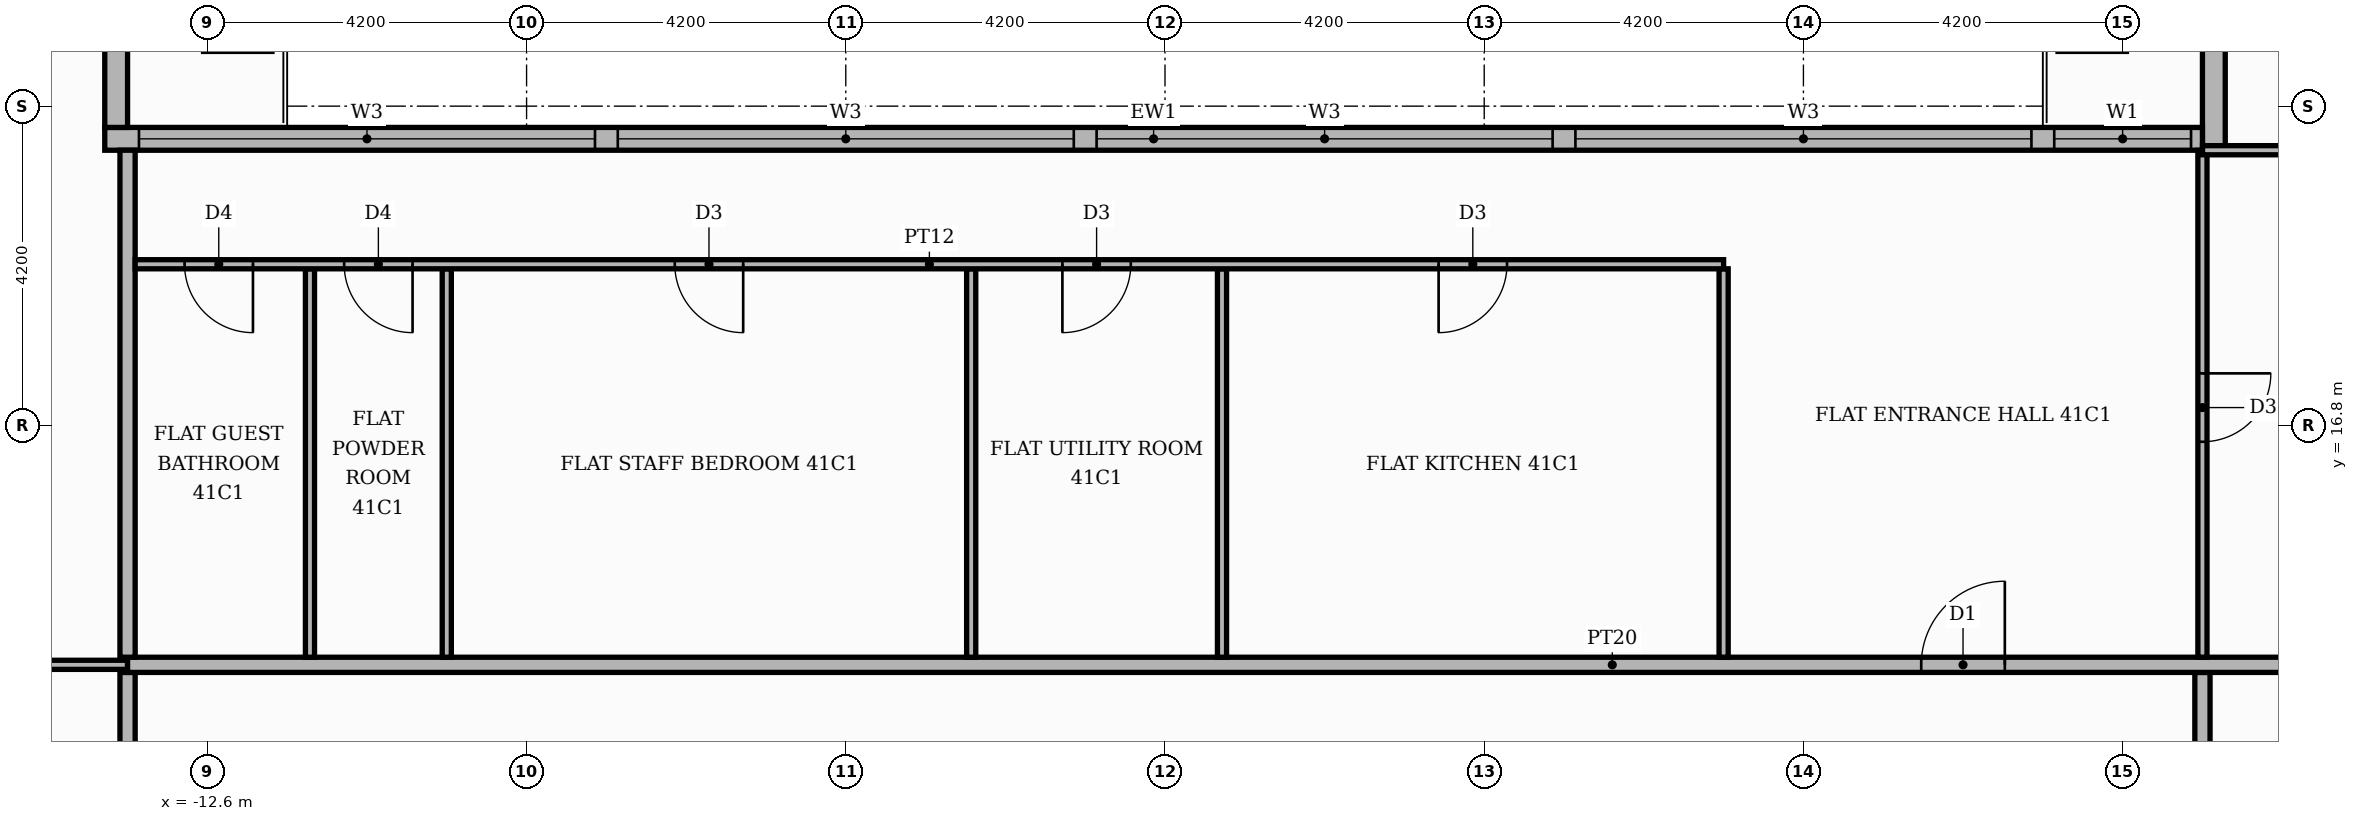
"""IFC4 building model, lengths in metres.
Left out: names, types, materials, properties, quantities, classifications, styles, units other than length and angle.
Written with IfcOpenShell. Run it as: python <this file> out.ifc"""

import sys

from ifc_helpers import new_model, si_unit, direction, frame, frame_2d, origin, place, context, subcontext, project, spatial, rectangle, extrude, element, fill, save


model = new_model("IFC4")
c1 = context("Model", 3, precision=1e-05, world=origin(), true_north=direction((0.0, 1.0)))
c2 = subcontext(c1, "Body", "Model", "MODEL_VIEW")
j1 = project(units=[si_unit("LENGTHUNIT", "METRE"), si_unit("PLANEANGLEUNIT", "RADIAN")], contexts=[c1])
p1 = place(None, origin())
s1 = spatial("IfcSite", under=j1, at=p1, CompositionType="ELEMENT")
p2 = place(p1, origin())
s2 = spatial("IfcBuilding", under=s1, at=p2, CompositionType="ELEMENT")
p3 = place(p2, frame((0.0, 0.0, 172.8)))
s3 = spatial("IfcBuildingStorey", under=s2, at=p3, CompositionType="ELEMENT", Elevation=172.8)
p4 = place(p3, frame((13.8, 25.42, 0.0), z_axis=(0.0, 0.0, 1.0), x_axis=(0.0, -1.0, 0.0)))
e1 = element("IfcWall", 1, at=p4, inside=s3, PredefinedType="STANDARD", context=c2, shape_type="SweptSolid", body=[
    extrude(rectangle(XDim=5.0, YDim=0.3, at=frame_2d((2.5, 0.0))), origin(), (0.0, 0.0, 1.0), 3.48),
])
p5 = place(p4, frame((1.42, 0.0, 0.0)))
e2 = element("IfcOpeningElement", 2, at=p5, cuts=e1, PredefinedType="OPENING", context=c2, shape_type="SweptSolid", body=[
    extrude(rectangle(XDim=1.8, YDim=2.4, at=frame_2d((0.9, 1.2))), frame((0.0, 0.16, 0.0), z_axis=(0.0, -1.0, 0.0), x_axis=(1.0, 0.0, 0.0)), (0.0, 0.0, 1.0), 0.32),
])
p6 = place(p3, frame((13.65, 20.57, 0.0), z_axis=(0.0, 0.0, 1.0), x_axis=(-1.0, 0.0, 0.0)))
e3 = element("IfcWall", 3, at=p6, inside=s3, PredefinedType="STANDARD", context=c2, shape_type="SweptSolid", body=[
    extrude(rectangle(XDim=27.6, YDim=0.3, at=frame_2d((13.8, 0.0))), origin(), (0.0, 0.0, 1.0), 3.48),
])
p7 = place(p6, frame((0.15, 0.0, 0.9)))
e4 = element("IfcOpeningElement", 4, at=p7, cuts=e3, PredefinedType="OPENING", context=c2, shape_type="SweptSolid", body=[
    extrude(rectangle(XDim=1.8, YDim=2.1, at=frame_2d((0.9, 1.05))), frame((0.0, 0.16, 0.0), z_axis=(0.0, -1.0, 0.0), x_axis=(1.0, 0.0, 0.0)), (0.0, 0.0, 1.0), 0.32),
])
p8 = place(p6, frame((2.25, 0.0, 0.9)))
e5 = element("IfcOpeningElement", 5, at=p8, cuts=e3, PredefinedType="OPENING", context=c2, shape_type="SweptSolid", body=[
    extrude(rectangle(XDim=6.0, YDim=2.1, at=frame_2d((3.0, 1.05))), frame((0.0, 0.16, 0.0), z_axis=(0.0, -1.0, 0.0), x_axis=(1.0, 0.0, 0.0)), (0.0, 0.0, 1.0), 0.32),
])
p9 = place(p6, frame((8.55, 0.0, 0.9)))
e6 = element("IfcOpeningElement", 6, at=p9, cuts=e3, PredefinedType="OPENING", context=c2, shape_type="SweptSolid", body=[
    extrude(rectangle(XDim=6.0, YDim=2.1, at=frame_2d((3.0, 1.05))), frame((0.0, 0.16, 0.0), z_axis=(0.0, -1.0, 0.0), x_axis=(1.0, 0.0, 0.0)), (0.0, 0.0, 1.0), 0.32),
])
p10 = place(p6, frame((14.85, 0.0, 0.9)))
e7 = element("IfcOpeningElement", 7, at=p10, cuts=e3, PredefinedType="OPENING", context=c2, shape_type="SweptSolid", body=[
    extrude(rectangle(XDim=6.0, YDim=2.1, at=frame_2d((3.0, 1.05))), frame((0.0, 0.16, 0.0), z_axis=(0.0, -1.0, 0.0), x_axis=(1.0, 0.0, 0.0)), (0.0, 0.0, 1.0), 0.32),
])
p11 = place(p6, frame((21.15, 0.0, 0.9)))
e8 = element("IfcOpeningElement", 8, at=p11, cuts=e3, PredefinedType="OPENING", context=c2, shape_type="SweptSolid", body=[
    extrude(rectangle(XDim=6.0, YDim=2.1, at=frame_2d((3.0, 1.05))), frame((0.0, 0.16, 0.0), z_axis=(0.0, -1.0, 0.0), x_axis=(1.0, 0.0, 0.0)), (0.0, 0.0, 1.0), 0.32),
])
p12 = place(p3, frame((-13.8, 20.72, 0.0), z_axis=(0.0, 0.0, 1.0), x_axis=(0.0, 1.0, 0.0)))
e9 = element("IfcWall", 9, at=p12, inside=s3, PredefinedType="STANDARD", context=c2, shape_type="SweptSolid", body=[
    extrude(rectangle(XDim=5.0, YDim=0.3, at=frame_2d((2.5, 0.0))), origin(), (0.0, 0.0, 1.0), 3.48),
])
p13 = place(p12, frame((1.48, 0.0, 0.0)))
e10 = element("IfcOpeningElement", 10, at=p13, cuts=e9, PredefinedType="OPENING", context=c2, shape_type="SweptSolid", body=[
    extrude(rectangle(XDim=1.8, YDim=2.4, at=frame_2d((0.9, 1.2))), frame((0.0, 0.16, 0.0), z_axis=(0.0, -1.0, 0.0), x_axis=(1.0, 0.0, 0.0)), (0.0, 0.0, 1.0), 0.32),
])
for number, where, z_axis, x_axis in (
    (11, (-13.65, 11.1, 0.0), (0.0, 0.0, 1.0), (0.0, 1.0, 0.0)),
    (12, (13.65, 11.1, 0.0), (0.0, 0.0, 1.0), (0.0, 1.0, 0.0)),
):
    element("IfcWall", number, at=place(p3, frame(where, z_axis=z_axis, x_axis=x_axis)), inside=s3, PredefinedType="PARTITIONING", context=c2, shape_type="SweptSolid", body=[
        extrude(rectangle(XDim=2.45, YDim=0.2, at=frame_2d((1.225, 0.0))), origin(), (0.0, 0.0, 1.0), 3.48),
    ])
p14 = place(p3, frame((-20.72, 13.65, 0.0), z_axis=(0.0, 0.0, 1.0), x_axis=(1.0, 0.0, 0.0)))
e13 = element("IfcWall", 13, at=p14, inside=s3, PredefinedType="PARTITIONING", context=c2, shape_type="SweptSolid", body=[
    extrude(rectangle(XDim=7.07, YDim=0.12, at=frame_2d((3.535, 0.0))), origin(), (0.0, 0.0, 1.0), 3.48),
])
p15 = place(p14, frame((3.085, 0.0, 0.0)))
e14 = element("IfcOpeningElement", 14, at=p15, cuts=e13, PredefinedType="OPENING", context=c2, shape_type="SweptSolid", body=[
    extrude(rectangle(XDim=0.9, YDim=2.1, at=frame_2d((0.45, 1.05))), frame((0.0, 0.07, 0.0), z_axis=(0.0, -1.0, 0.0), x_axis=(1.0, 0.0, 0.0)), (0.0, 0.0, 1.0), 0.14),
])
p16 = place(p3, frame((-13.65, 13.65, 0.0), z_axis=(0.0, 0.0, 1.0), x_axis=(1.0, 0.0, 0.0)))
e15 = element("IfcWall", 15, at=p16, inside=s3, PredefinedType="PARTITIONING", context=c2, shape_type="SweptSolid", body=[
    extrude(rectangle(XDim=39.07, YDim=0.2, at=frame_2d((19.535, 0.0))), origin(), (0.0, 0.0, 1.0), 3.48),
])
p17 = place(p16, frame((23.6, 0.0, 0.0)))
e16 = element("IfcOpeningElement", 16, at=p17, cuts=e15, PredefinedType="OPENING", context=c2, shape_type="SweptSolid", body=[
    extrude(rectangle(XDim=1.1, YDim=2.4, at=frame_2d((0.55, 1.2))), frame((0.0, 0.11, 0.0), z_axis=(0.0, -1.0, 0.0), x_axis=(1.0, 0.0, 0.0)), (0.0, 0.0, 1.0), 0.22),
])
p18 = place(p3, frame((-13.65, 13.75, 0.0), z_axis=(0.0, 0.0, 1.0), x_axis=(0.0, 1.0, 0.0)))
e17 = element("IfcWall", 17, at=p18, inside=s3, PredefinedType="PARTITIONING", context=c2, shape_type="SweptSolid", body=[
    extrude(rectangle(XDim=6.67, YDim=0.2, at=frame_2d((3.335, 0.0))), origin(), (0.0, 0.0, 1.0), 3.48),
])
for number, where, z_axis, x_axis in (
    (18, (-11.25, 13.75, 0.0), (0.0, 0.0, 1.0), (0.0, 1.0, 0.0)),
    (19, (-9.45, 13.75, 0.0), (0.0, 0.0, 1.0), (0.0, 1.0, 0.0)),
    (20, (-2.55, 13.75, 0.0), (0.0, 0.0, 1.0), (0.0, 1.0, 0.0)),
    (21, (0.75, 13.75, 0.0), (0.0, 0.0, 1.0), (0.0, 1.0, 0.0)),
    (22, (7.35, 13.75, 0.0), (0.0, 0.0, 1.0), (0.0, 1.0, 0.0)),
):
    element("IfcWall", number, at=place(p3, frame(where, z_axis=z_axis, x_axis=x_axis)), inside=s3, PredefinedType="PARTITIONING", context=c2, shape_type="SweptSolid", body=[
        extrude(rectangle(XDim=5.11, YDim=0.12, at=frame_2d((2.555, 0.0))), origin(), (0.0, 0.0, 1.0), 3.48),
    ])
p19 = place(p3, frame((13.65, 13.75, 0.0), z_axis=(0.0, 0.0, 1.0), x_axis=(0.0, 1.0, 0.0)))
e23 = element("IfcWall", 23, at=p19, inside=s3, PredefinedType="PARTITIONING", context=c2, shape_type="SweptSolid", body=[
    extrude(rectangle(XDim=6.669, YDim=0.12, at=frame_2d((3.334, 0.0))), origin(), (0.0, 0.0, 1.0), 3.48),
])
p20 = place(p19, frame((2.834, 0.0, 0.0)))
e24 = element("IfcOpeningElement", 24, at=p20, cuts=e23, PredefinedType="OPENING", context=c2, shape_type="SweptSolid", body=[
    extrude(rectangle(XDim=0.9, YDim=2.1, at=frame_2d((0.45, 1.05))), frame((0.0, 0.07, 0.0), z_axis=(0.0, -1.0, 0.0), x_axis=(1.0, 0.0, 0.0)), (0.0, 0.0, 1.0), 0.14),
])
p21 = place(p3, frame((-13.55, 18.92, 0.0), z_axis=(0.0, 0.0, 1.0), x_axis=(1.0, 0.0, 0.0)))
e25 = element("IfcWall", 25, at=p21, inside=s3, PredefinedType="PARTITIONING", context=c2, shape_type="SweptSolid", body=[
    extrude(rectangle(XDim=20.9, YDim=0.12, at=frame_2d((10.45, 0.0))), origin(), (0.0, 0.0, 1.0), 3.48),
])
p22 = place(p21, frame((17.15, 0.0, 0.0)))
e26 = element("IfcOpeningElement", 26, at=p22, cuts=e25, PredefinedType="OPENING", context=c2, shape_type="SweptSolid", body=[
    extrude(rectangle(XDim=0.9, YDim=2.1, at=frame_2d((0.45, 1.05))), frame((0.0, 0.07, 0.0), z_axis=(0.0, -1.0, 0.0), x_axis=(1.0, 0.0, 0.0)), (0.0, 0.0, 1.0), 0.14),
])
p23 = place(p21, frame((12.2, 0.0, 0.0)))
e27 = element("IfcOpeningElement", 27, at=p23, cuts=e25, PredefinedType="OPENING", context=c2, shape_type="SweptSolid", body=[
    extrude(rectangle(XDim=0.9, YDim=2.1, at=frame_2d((0.45, 1.05))), frame((0.0, 0.07, 0.0), z_axis=(0.0, -1.0, 0.0), x_axis=(1.0, 0.0, 0.0)), (0.0, 0.0, 1.0), 0.14),
])
p24 = place(p21, frame((7.1, 0.0, 0.0)))
e28 = element("IfcOpeningElement", 28, at=p24, cuts=e25, PredefinedType="OPENING", context=c2, shape_type="SweptSolid", body=[
    extrude(rectangle(XDim=0.9, YDim=2.1, at=frame_2d((0.45, 1.05))), frame((0.0, 0.07, 0.0), z_axis=(0.0, -1.0, 0.0), x_axis=(1.0, 0.0, 0.0)), (0.0, 0.0, 1.0), 0.14),
])
p25 = place(p21, frame((2.75, 0.0, 0.0)))
e29 = element("IfcOpeningElement", 29, at=p25, cuts=e25, PredefinedType="OPENING", context=c2, shape_type="SweptSolid", body=[
    extrude(rectangle(XDim=0.9, YDim=2.1, at=frame_2d((0.45, 1.05))), frame((0.0, 0.07, 0.0), z_axis=(0.0, -1.0, 0.0), x_axis=(1.0, 0.0, 0.0)), (0.0, 0.0, 1.0), 0.14),
])
p26 = place(p21, frame((0.65, 0.0, 0.0)))
e30 = element("IfcOpeningElement", 30, at=p26, cuts=e25, PredefinedType="OPENING", context=c2, shape_type="SweptSolid", body=[
    extrude(rectangle(XDim=0.9, YDim=2.1, at=frame_2d((0.45, 1.05))), frame((0.0, 0.07, 0.0), z_axis=(0.0, -1.0, 0.0), x_axis=(1.0, 0.0, 0.0)), (0.0, 0.0, 1.0), 0.14),
])
p27 = place(p3, frame((13.651, 20.42, 0.0), z_axis=(0.0, 0.0, 1.0), x_axis=(1.0, 0.0, 0.0)))
e31 = element("IfcWall", 31, at=p27, inside=s3, PredefinedType="PARTITIONING", context=c2, shape_type="SweptSolid", body=[
    extrude(rectangle(XDim=11.769, YDim=0.12, at=frame_2d((5.885, 0.0))), origin(), (0.0, 0.0, 1.0), 3.48),
])
p28 = place(p27, frame((7.345, 0.0, 0.0)))
e32 = element("IfcOpeningElement", 32, at=p28, cuts=e31, PredefinedType="OPENING", context=c2, shape_type="SweptSolid", body=[
    extrude(rectangle(XDim=1.0, YDim=2.1, at=frame_2d((0.5, 1.05))), frame((0.0, 0.07, 0.0), z_axis=(0.0, -1.0, 0.0), x_axis=(1.0, 0.0, 0.0)), (0.0, 0.0, 1.0), 0.14),
])
p29 = place(p7, origin())
e33 = element("IfcWindow", 33, at=p29, inside=s3, PartitioningType="SINGLE_PANEL", PredefinedType="WINDOW", context=c2, shape_type="SweptSolid", body=[
    extrude(rectangle(XDim=1.8, YDim=2.1, at=frame_2d((0.9, 1.05))), frame((0.0, 0.03, 0.0), z_axis=(0.0, -1.0, 0.0), x_axis=(1.0, 0.0, 0.0)), (0.0, 0.0, 1.0), 0.06),
])
fill(e4, e33)
p30 = place(p8, origin())
e34 = element("IfcWindow", 34, at=p30, inside=s3, PartitioningType="SINGLE_PANEL", PredefinedType="WINDOW", context=c2, shape_type="SweptSolid", body=[
    extrude(rectangle(XDim=6.0, YDim=2.1, at=frame_2d((3.0, 1.05))), frame((0.0, 0.03, 0.0), z_axis=(0.0, -1.0, 0.0), x_axis=(1.0, 0.0, 0.0)), (0.0, 0.0, 1.0), 0.06),
])
fill(e5, e34)
p31 = place(p9, origin())
e35 = element("IfcWindow", 35, at=p31, inside=s3, PartitioningType="SINGLE_PANEL", PredefinedType="WINDOW", context=c2, shape_type="SweptSolid", body=[
    extrude(rectangle(XDim=6.0, YDim=2.1, at=frame_2d((3.0, 1.05))), frame((0.0, 0.03, 0.0), z_axis=(0.0, -1.0, 0.0), x_axis=(1.0, 0.0, 0.0)), (0.0, 0.0, 1.0), 0.06),
])
fill(e6, e35)
p32 = place(p10, origin())
e36 = element("IfcWindow", 36, at=p32, inside=s3, PartitioningType="SINGLE_PANEL", PredefinedType="WINDOW", context=c2, shape_type="SweptSolid", body=[
    extrude(rectangle(XDim=6.0, YDim=2.1, at=frame_2d((3.0, 1.05))), frame((0.0, 0.03, 0.0), z_axis=(0.0, -1.0, 0.0), x_axis=(1.0, 0.0, 0.0)), (0.0, 0.0, 1.0), 0.06),
])
fill(e7, e36)
p33 = place(p11, origin())
e37 = element("IfcWindow", 37, at=p33, inside=s3, PartitioningType="SINGLE_PANEL", PredefinedType="WINDOW", context=c2, shape_type="SweptSolid", body=[
    extrude(rectangle(XDim=6.0, YDim=2.1, at=frame_2d((3.0, 1.05))), frame((0.0, 0.03, 0.0), z_axis=(0.0, -1.0, 0.0), x_axis=(1.0, 0.0, 0.0)), (0.0, 0.0, 1.0), 0.06),
])
fill(e8, e37)
p34 = place(p17, origin())
e38 = element("IfcDoor", 38, at=p34, inside=s3, OperationType="SINGLE_SWING_RIGHT", PredefinedType="DOOR", context=c2, shape_type="SweptSolid", body=[
    extrude(rectangle(XDim=1.1, YDim=2.4, at=frame_2d((0.55, 1.2))), frame((0.0, 0.025, 0.0), z_axis=(0.0, -1.0, 0.0), x_axis=(1.0, 0.0, 0.0)), (0.0, 0.0, 1.0), 0.05),
])
fill(e16, e38)
p35 = place(p20, frame((0.9, 0.0, 0.0), z_axis=(0.0, 0.0, 1.0), x_axis=(-1.0, 0.0, 0.0)))
e39 = element("IfcDoor", 39, at=p35, inside=s3, OperationType="SINGLE_SWING_RIGHT", PredefinedType="DOOR", context=c2, shape_type="SweptSolid", body=[
    extrude(rectangle(XDim=0.9, YDim=2.1, at=frame_2d((0.45, 1.05))), frame((0.0, 0.025, 0.0), z_axis=(0.0, -1.0, 0.0), x_axis=(1.0, 0.0, 0.0)), (0.0, 0.0, 1.0), 0.05),
])
fill(e24, e39)
p36 = place(p22, frame((0.9, 0.0, 0.0), z_axis=(0.0, 0.0, 1.0), x_axis=(-1.0, 0.0, 0.0)))
e40 = element("IfcDoor", 40, at=p36, inside=s3, OperationType="SINGLE_SWING_LEFT", PredefinedType="DOOR", context=c2, shape_type="SweptSolid", body=[
    extrude(rectangle(XDim=0.9, YDim=2.1, at=frame_2d((0.45, 1.05))), frame((0.0, 0.025, 0.0), z_axis=(0.0, -1.0, 0.0), x_axis=(1.0, 0.0, 0.0)), (0.0, 0.0, 1.0), 0.05),
])
fill(e26, e40)
p37 = place(p23, frame((0.9, 0.0, 0.0), z_axis=(0.0, 0.0, 1.0), x_axis=(-1.0, 0.0, 0.0)))
e41 = element("IfcDoor", 41, at=p37, inside=s3, OperationType="SINGLE_SWING_LEFT", PredefinedType="DOOR", context=c2, shape_type="SweptSolid", body=[
    extrude(rectangle(XDim=0.9, YDim=2.1, at=frame_2d((0.45, 1.05))), frame((0.0, 0.025, 0.0), z_axis=(0.0, -1.0, 0.0), x_axis=(1.0, 0.0, 0.0)), (0.0, 0.0, 1.0), 0.05),
])
fill(e27, e41)
p38 = place(p24, frame((0.9, 0.0, 0.0), z_axis=(0.0, 0.0, 1.0), x_axis=(-1.0, 0.0, 0.0)))
e42 = element("IfcDoor", 42, at=p38, inside=s3, OperationType="SINGLE_SWING_RIGHT", PredefinedType="DOOR", context=c2, shape_type="SweptSolid", body=[
    extrude(rectangle(XDim=0.9, YDim=2.1, at=frame_2d((0.45, 1.05))), frame((0.0, 0.025, 0.0), z_axis=(0.0, -1.0, 0.0), x_axis=(1.0, 0.0, 0.0)), (0.0, 0.0, 1.0), 0.05),
])
fill(e28, e42)
p39 = place(p25, frame((0.9, 0.0, 0.0), z_axis=(0.0, 0.0, 1.0), x_axis=(-1.0, 0.0, 0.0)))
e43 = element("IfcDoor", 43, at=p39, inside=s3, OperationType="SINGLE_SWING_RIGHT", PredefinedType="DOOR", context=c2, shape_type="SweptSolid", body=[
    extrude(rectangle(XDim=0.9, YDim=2.1, at=frame_2d((0.45, 1.05))), frame((0.0, 0.025, 0.0), z_axis=(0.0, -1.0, 0.0), x_axis=(1.0, 0.0, 0.0)), (0.0, 0.0, 1.0), 0.05),
])
fill(e29, e43)
p40 = place(p26, frame((0.9, 0.0, 0.0), z_axis=(0.0, 0.0, 1.0), x_axis=(-1.0, 0.0, 0.0)))
e44 = element("IfcDoor", 44, at=p40, inside=s3, OperationType="SINGLE_SWING_RIGHT", PredefinedType="DOOR", context=c2, shape_type="SweptSolid", body=[
    extrude(rectangle(XDim=0.9, YDim=2.1, at=frame_2d((0.45, 1.05))), frame((0.0, 0.025, 0.0), z_axis=(0.0, -1.0, 0.0), x_axis=(1.0, 0.0, 0.0)), (0.0, 0.0, 1.0), 0.05),
])
fill(e30, e44)
save(model, sys.argv[1])
